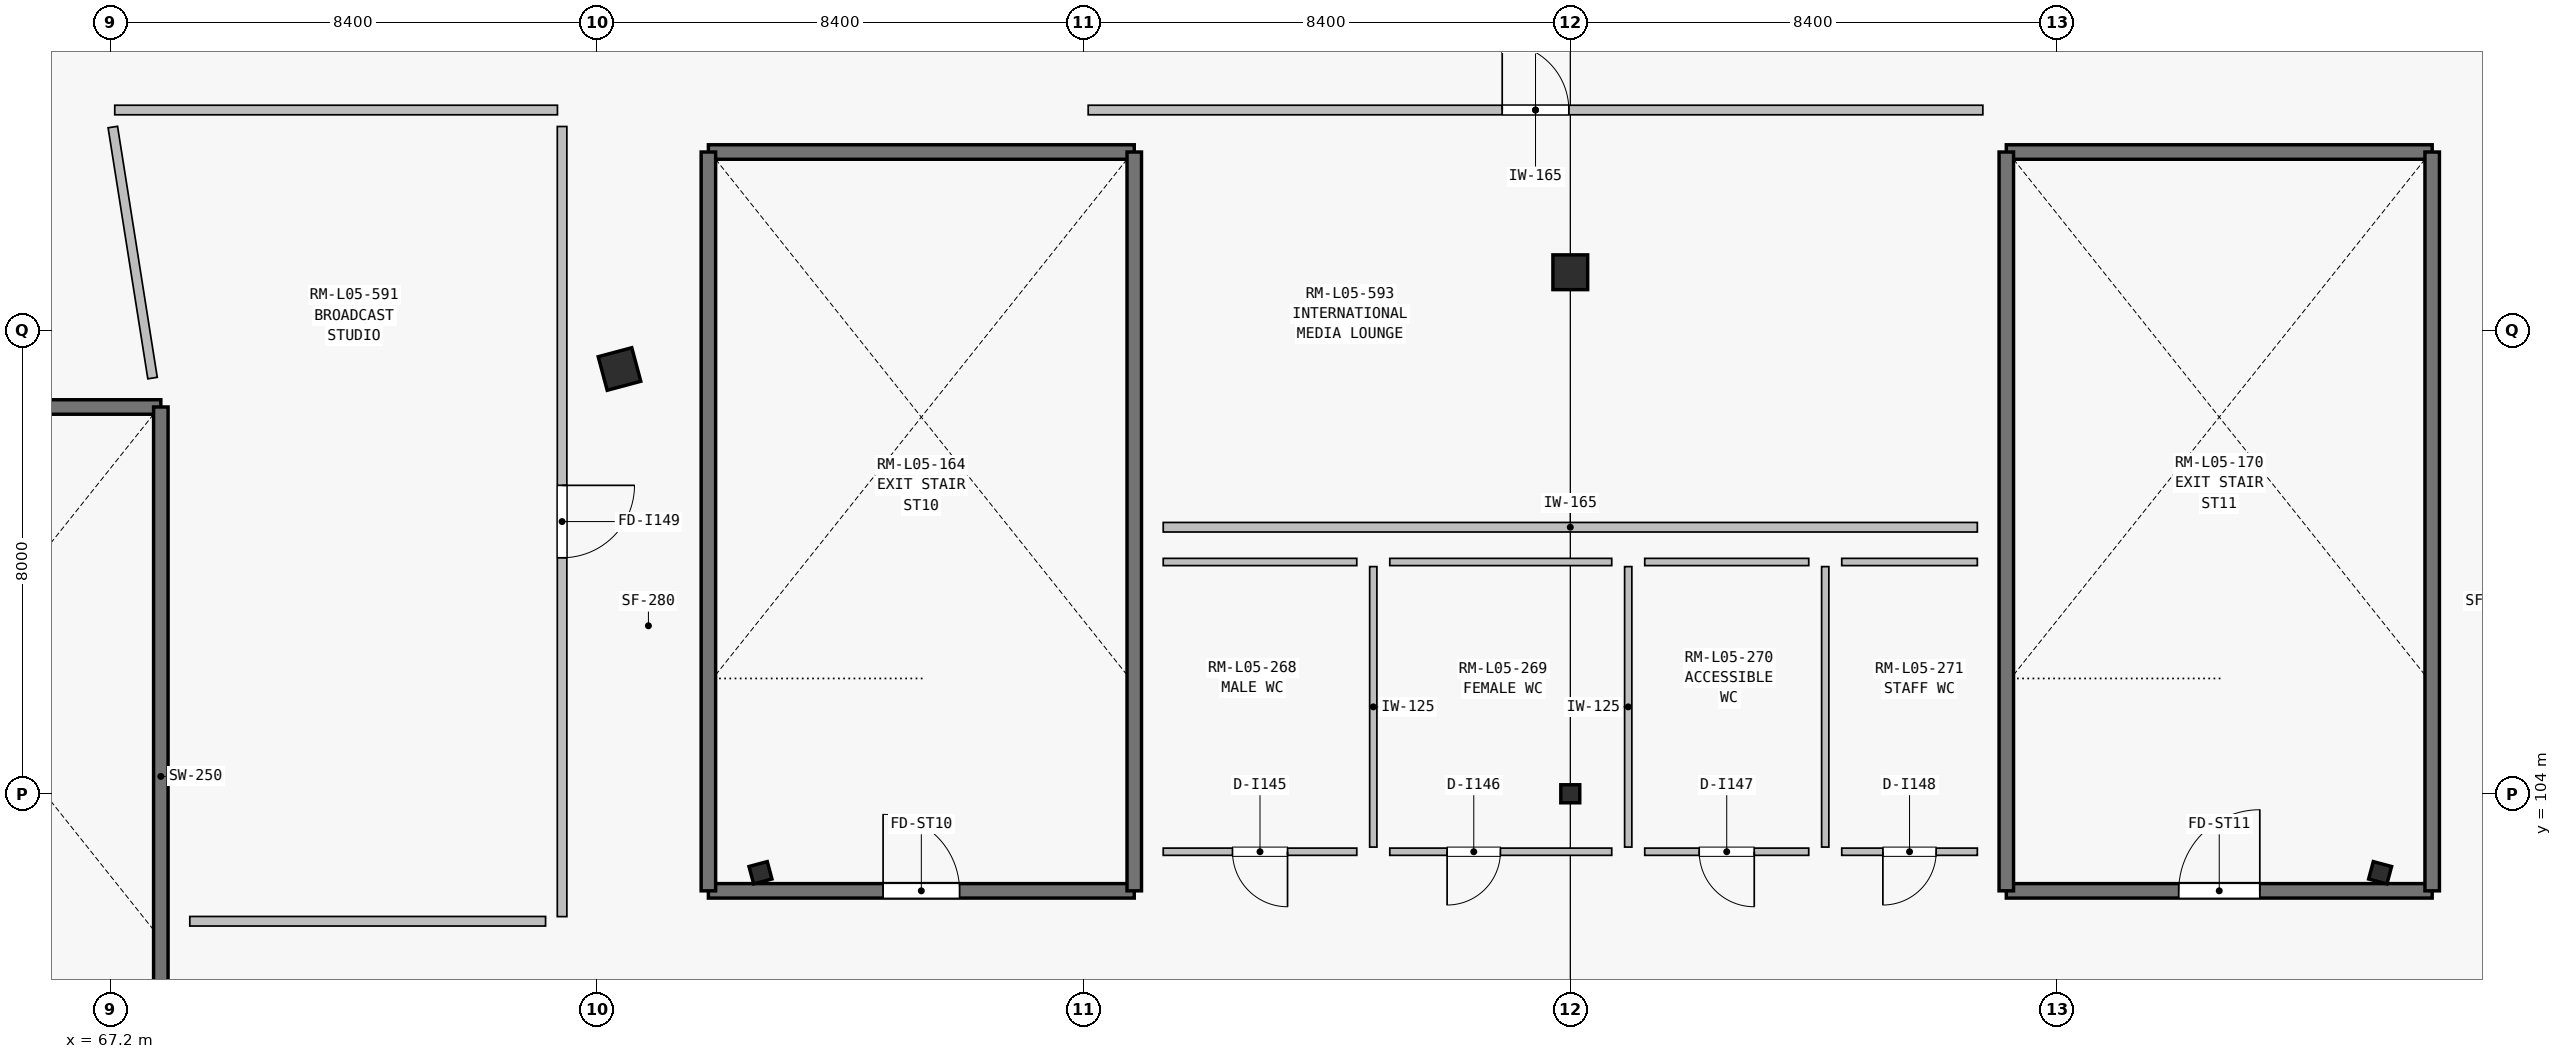
"""IFC4 building model, lengths in metres.
Left out: names, types, materials, properties, quantities, classifications, styles, units other than length and angle.
Written with IfcOpenShell. Run it as: python <this file> out.ifc"""

import sys

from ifc_helpers import new_model, si_unit, direction, frame, frame_2d, origin, origin_2d, place, context, subcontext, project, spatial, rectangle, i_section, extrude, element, fill, save


model = new_model("IFC4")
c1 = context("Model", 3, precision=1e-05, world=origin(), true_north=direction((0.0, 1.0)))
c2 = subcontext(c1, "Body", "Model", "MODEL_VIEW")
j1 = project(units=[si_unit("LENGTHUNIT", "METRE"), si_unit("PLANEANGLEUNIT", "RADIAN")], contexts=[c1])
p1 = place(None, origin())
s1 = spatial("IfcSite", under=j1, at=p1, CompositionType="ELEMENT")
p2 = place(p1, origin())
s2 = spatial("IfcBuilding", under=s1, at=p2, CompositionType="ELEMENT")
p3 = place(p2, frame((0.0, 0.0, 23.4)))
s3 = spatial("IfcBuildingStorey", under=s2, at=p3, CompositionType="ELEMENT", Elevation=23.4)
for number, where, z_axis, x_axis in (
    (1, (106.376, 102.637, 0.0), (0.0, 0.0, 1.0), (0.259, 0.966, 0.0)),
    (2, (92.4, 104.0, 0.0), (0.0, 0.0, 1.0), (0.0, 1.0, 0.0)),
    (3, (78.424, 102.637, 0.0), (0.0, 0.0, 1.0), (-0.259, 0.966, 0.0)),
):
    element("IfcColumn", number, at=place(p3, frame(where, z_axis=z_axis, x_axis=x_axis)), inside=s3, PredefinedType="COLUMN", context=c2, shape_type="SweptSolid", body=[
        extrude(i_section(OverallWidth=0.311, OverallDepth=0.327, WebThickness=0.016, FlangeThickness=0.025, at=origin_2d()), origin(), (0.0, 0.0, 1.0), 3.15),
    ])
for number, where, z_axis, x_axis in (
    (4, (92.4, 113.0, 0.0), (0.0, 0.0, 1.0), (0.0, 1.0, 0.0)),
    (5, (75.991, 111.33, 0.0), (0.0, 0.0, 1.0), (-0.259, 0.966, 0.0)),
):
    element("IfcColumn", number, at=place(p3, frame(where, z_axis=z_axis, x_axis=x_axis)), inside=s3, PredefinedType="COLUMN", context=c2, shape_type="SweptSolid", body=[
        extrude(rectangle(XDim=0.6, YDim=0.6, at=origin_2d()), origin(), (0.0, 0.0, 1.0), 3.15),
    ])
p4 = place(p3, frame((56.095, 113.709, 0.0), z_axis=(0.0, 0.0, 1.0), x_axis=(0.949760483421, 0.312977673536, 0.0)))
e6 = element("IfcWall", 6, at=p4, inside=s3, PredefinedType="SOLIDWALL", context=c2, shape_type="SweptSolid", body=[
    extrude(rectangle(XDim=18.693, YDim=0.265, at=frame_2d((9.346, 0.0))), origin(), (0.0, 0.0, 1.0), 3.18),
])
p5 = place(p4, frame((1.75, 0.0, 0.9)))
e7 = element("IfcOpeningElement", 7, at=p5, cuts=e6, PredefinedType="OPENING", context=c2, shape_type="SweptSolid", body=[
    extrude(rectangle(XDim=3.0, YDim=1.6, at=frame_2d((1.5, 0.8))), frame((0.0, 0.142, 0.0), z_axis=(0.0, -1.0, 0.0), x_axis=(1.0, 0.0, 0.0)), (0.0, 0.0, 1.0), 0.285),
])
p6 = place(p4, frame((6.5, 0.0, 0.9)))
e8 = element("IfcOpeningElement", 8, at=p6, cuts=e6, PredefinedType="OPENING", context=c2, shape_type="SweptSolid", body=[
    extrude(rectangle(XDim=2.7, YDim=1.55, at=frame_2d((1.35, 0.775))), frame((0.0, 0.142, 0.0), z_axis=(0.0, -1.0, 0.0), x_axis=(1.0, 0.0, 0.0)), (0.0, 0.0, 1.0), 0.285),
])
p7 = place(p4, frame((11.15, 0.0, 0.9)))
e9 = element("IfcOpeningElement", 9, at=p7, cuts=e6, PredefinedType="OPENING", context=c2, shape_type="SweptSolid", body=[
    extrude(rectangle(XDim=2.6, YDim=1.4, at=frame_2d((1.3, 0.7))), frame((0.0, 0.142, 0.0), z_axis=(0.0, -1.0, 0.0), x_axis=(1.0, 0.0, 0.0)), (0.0, 0.0, 1.0), 0.285),
])
p8 = place(p3, frame((60.725, 110.675, 0.0), z_axis=(0.0, 0.0, 1.0), x_axis=(1.0, 0.0, 0.0)))
e10 = element("IfcWall", 10, at=p8, inside=s3, PredefinedType="SHEAR", context=c2, shape_type="SweptSolid", body=[
    extrude(rectangle(XDim=7.35, YDim=0.25, at=frame_2d((3.675, 0.0))), origin(), (0.0, 0.0, 1.0), 3.08),
])
p9 = place(p3, frame((68.075, 97.925, 0.0), z_axis=(0.0, 0.0, 1.0), x_axis=(0.0, 1.0, 0.0)))
e11 = element("IfcWall", 11, at=p9, inside=s3, PredefinedType="SHEAR", context=c2, shape_type="SweptSolid", body=[
    extrude(rectangle(XDim=12.75, YDim=0.25, at=frame_2d((6.375, 0.0))), origin(), (0.0, 0.0, 1.0), 3.08),
])
p10 = place(p3, frame((77.525, 102.325, 0.0), z_axis=(0.0, 0.0, 1.0), x_axis=(1.0, 0.0, 0.0)))
e12 = element("IfcWall", 12, at=p10, inside=s3, PredefinedType="SHEAR", context=c2, shape_type="SweptSolid", body=[
    extrude(rectangle(XDim=7.35, YDim=0.25, at=frame_2d((3.675, 0.0))), origin(), (0.0, 0.0, 1.0), 3.08),
])
p11 = place(p10, frame((3.015, 0.0, 0.0)))
e13 = element("IfcOpeningElement", 13, at=p11, cuts=e12, PredefinedType="OPENING", context=c2, shape_type="SweptSolid", body=[
    extrude(rectangle(XDim=1.32, YDim=2.2, at=frame_2d((0.66, 1.1))), frame((0.0, 0.135, 0.0), z_axis=(0.0, -1.0, 0.0), x_axis=(1.0, 0.0, 0.0)), (0.0, 0.0, 1.0), 0.27),
])
p12 = place(p3, frame((77.525, 115.075, 0.0), z_axis=(0.0, 0.0, 1.0), x_axis=(1.0, 0.0, 0.0)))
e14 = element("IfcWall", 14, at=p12, inside=s3, PredefinedType="SHEAR", context=c2, shape_type="SweptSolid", body=[
    extrude(rectangle(XDim=7.35, YDim=0.25, at=frame_2d((3.675, 0.0))), origin(), (0.0, 0.0, 1.0), 3.08),
])
for number, where, z_axis, x_axis in (
    (15, (77.525, 102.325, 0.0), (0.0, 0.0, 1.0), (0.0, 1.0, 0.0)),
    (16, (84.875, 102.325, 0.0), (0.0, 0.0, 1.0), (0.0, 1.0, 0.0)),
):
    element("IfcWall", number, at=place(p3, frame(where, z_axis=z_axis, x_axis=x_axis)), inside=s3, PredefinedType="SHEAR", context=c2, shape_type="SweptSolid", body=[
        extrude(rectangle(XDim=12.75, YDim=0.25, at=frame_2d((6.375, 0.0))), origin(), (0.0, 0.0, 1.0), 3.08),
    ])
p13 = place(p3, frame((99.925, 102.325, 0.0), z_axis=(0.0, 0.0, 1.0), x_axis=(1.0, 0.0, 0.0)))
e17 = element("IfcWall", 17, at=p13, inside=s3, PredefinedType="SHEAR", context=c2, shape_type="SweptSolid", body=[
    extrude(rectangle(XDim=7.35, YDim=0.25, at=frame_2d((3.675, 0.0))), origin(), (0.0, 0.0, 1.0), 3.08),
])
p14 = place(p13, frame((2.975, 0.0, 0.0)))
e18 = element("IfcOpeningElement", 18, at=p14, cuts=e17, PredefinedType="OPENING", context=c2, shape_type="SweptSolid", body=[
    extrude(rectangle(XDim=1.4, YDim=2.2, at=frame_2d((0.7, 1.1))), frame((0.0, 0.135, 0.0), z_axis=(0.0, -1.0, 0.0), x_axis=(1.0, 0.0, 0.0)), (0.0, 0.0, 1.0), 0.27),
])
p15 = place(p3, frame((99.925, 115.075, 0.0), z_axis=(0.0, 0.0, 1.0), x_axis=(1.0, 0.0, 0.0)))
e19 = element("IfcWall", 19, at=p15, inside=s3, PredefinedType="SHEAR", context=c2, shape_type="SweptSolid", body=[
    extrude(rectangle(XDim=7.35, YDim=0.25, at=frame_2d((3.675, 0.0))), origin(), (0.0, 0.0, 1.0), 3.08),
])
for number, where, z_axis, x_axis in (
    (20, (99.925, 102.325, 0.0), (0.0, 0.0, 1.0), (0.0, 1.0, 0.0)),
    (21, (107.275, 102.325, 0.0), (0.0, 0.0, 1.0), (0.0, 1.0, 0.0)),
):
    element("IfcWall", number, at=place(p3, frame(where, z_axis=z_axis, x_axis=x_axis)), inside=s3, PredefinedType="SHEAR", context=c2, shape_type="SweptSolid", body=[
        extrude(rectangle(XDim=12.75, YDim=0.25, at=frame_2d((6.375, 0.0))), origin(), (0.0, 0.0, 1.0), 3.08),
    ])
p16 = place(p3, frame((89.0, 107.92, 0.0), z_axis=(0.0, 0.0, 1.0), x_axis=(0.0, -1.0, 0.0)))
e22 = element("IfcWall", 22, at=p16, inside=s3, PredefinedType="PARTITIONING", context=c2, shape_type="SweptSolid", body=[
    extrude(rectangle(XDim=4.84, YDim=0.125, at=frame_2d((2.42, 0.0))), origin(), (0.0, 0.0, 1.0), 2.445),
])
p17 = place(p3, frame((88.715, 103.0, 0.0), z_axis=(0.0, 0.0, 1.0), x_axis=(-1.0, 0.0, 0.0)))
e23 = element("IfcWall", 23, at=p17, inside=s3, PredefinedType="PARTITIONING", context=c2, shape_type="SweptSolid", body=[
    extrude(rectangle(XDim=3.34, YDim=0.125, at=frame_2d((1.67, 0.0))), origin(), (0.0, 0.0, 1.0), 2.445),
])
p18 = place(p17, frame((1.195, 0.0, 0.0)))
e24 = element("IfcOpeningElement", 24, at=p18, cuts=e23, PredefinedType="OPENING", context=c2, shape_type="SweptSolid", body=[
    extrude(rectangle(XDim=0.95, YDim=2.1, at=frame_2d((0.475, 1.05))), frame((0.0, 0.073, 0.0), z_axis=(0.0, -1.0, 0.0), x_axis=(1.0, 0.0, 0.0)), (0.0, 0.0, 1.0), 0.145),
])
p19 = place(p3, frame((85.375, 108.0, 0.0), z_axis=(0.0, 0.0, 1.0), x_axis=(1.0, 0.0, 0.0)))
e25 = element("IfcWall", 25, at=p19, inside=s3, PredefinedType="PARTITIONING", context=c2, shape_type="SweptSolid", body=[
    extrude(rectangle(XDim=3.34, YDim=0.125, at=frame_2d((1.67, 0.0))), origin(), (0.0, 0.0, 1.0), 3.18),
])
p20 = place(p3, frame((93.4, 107.92, 0.0), z_axis=(0.0, 0.0, 1.0), x_axis=(0.0, -1.0, 0.0)))
e26 = element("IfcWall", 26, at=p20, inside=s3, PredefinedType="PARTITIONING", context=c2, shape_type="SweptSolid", body=[
    extrude(rectangle(XDim=4.84, YDim=0.125, at=frame_2d((2.42, 0.0))), origin(), (0.0, 0.0, 1.0), 2.445),
])
p21 = place(p3, frame((93.115, 103.0, 0.0), z_axis=(0.0, 0.0, 1.0), x_axis=(-1.0, 0.0, 0.0)))
e27 = element("IfcWall", 27, at=p21, inside=s3, PredefinedType="PARTITIONING", context=c2, shape_type="SweptSolid", body=[
    extrude(rectangle(XDim=3.83, YDim=0.125, at=frame_2d((1.915, 0.0))), origin(), (0.0, 0.0, 1.0), 3.9),
])
p22 = place(p21, frame((1.921, 0.0, 0.0)))
e28 = element("IfcOpeningElement", 28, at=p22, cuts=e27, PredefinedType="OPENING", context=c2, shape_type="SweptSolid", body=[
    extrude(rectangle(XDim=0.92, YDim=2.1, at=frame_2d((0.46, 1.05))), frame((0.0, 0.073, 0.0), z_axis=(0.0, -1.0, 0.0), x_axis=(1.0, 0.0, 0.0)), (0.0, 0.0, 1.0), 0.145),
])
p23 = place(p3, frame((89.285, 108.0, 0.0), z_axis=(0.0, 0.0, 1.0), x_axis=(1.0, 0.0, 0.0)))
e29 = element("IfcWall", 29, at=p23, inside=s3, PredefinedType="PARTITIONING", context=c2, shape_type="SweptSolid", body=[
    extrude(rectangle(XDim=3.83, YDim=0.125, at=frame_2d((1.915, 0.0))), origin(), (0.0, 0.0, 1.0), 3.18),
])
p24 = place(p3, frame((96.8, 107.92, 0.0), z_axis=(0.0, 0.0, 1.0), x_axis=(0.0, -1.0, 0.0)))
e30 = element("IfcWall", 30, at=p24, inside=s3, PredefinedType="PARTITIONING", context=c2, shape_type="SweptSolid", body=[
    extrude(rectangle(XDim=4.84, YDim=0.125, at=frame_2d((2.42, 0.0))), origin(), (0.0, 0.0, 1.0), 2.445),
])
p25 = place(p3, frame((96.515, 103.0, 0.0), z_axis=(0.0, 0.0, 1.0), x_axis=(-1.0, 0.0, 0.0)))
e31 = element("IfcWall", 31, at=p25, inside=s3, PredefinedType="PARTITIONING", context=c2, shape_type="SweptSolid", body=[
    extrude(rectangle(XDim=2.83, YDim=0.125, at=frame_2d((1.415, 0.0))), origin(), (0.0, 0.0, 1.0), 3.9),
])
p26 = place(p25, frame((0.94, 0.0, 0.0)))
e32 = element("IfcOpeningElement", 32, at=p26, cuts=e31, PredefinedType="OPENING", context=c2, shape_type="SweptSolid", body=[
    extrude(rectangle(XDim=0.95, YDim=2.1, at=frame_2d((0.475, 1.05))), frame((0.0, 0.073, 0.0), z_axis=(0.0, -1.0, 0.0), x_axis=(1.0, 0.0, 0.0)), (0.0, 0.0, 1.0), 0.145),
])
p27 = place(p3, frame((93.685, 108.0, 0.0), z_axis=(0.0, 0.0, 1.0), x_axis=(1.0, 0.0, 0.0)))
e33 = element("IfcWall", 33, at=p27, inside=s3, PredefinedType="PARTITIONING", context=c2, shape_type="SweptSolid", body=[
    extrude(rectangle(XDim=2.83, YDim=0.125, at=frame_2d((1.415, 0.0))), origin(), (0.0, 0.0, 1.0), 3.18),
])
p28 = place(p3, frame((99.425, 103.0, 0.0), z_axis=(0.0, 0.0, 1.0), x_axis=(-1.0, 0.0, 0.0)))
e34 = element("IfcWall", 34, at=p28, inside=s3, PredefinedType="PARTITIONING", context=c2, shape_type="SweptSolid", body=[
    extrude(rectangle(XDim=2.34, YDim=0.125, at=frame_2d((1.17, 0.0))), origin(), (0.0, 0.0, 1.0), 2.445),
])
p29 = place(p28, frame((0.71, 0.0, 0.0)))
e35 = element("IfcOpeningElement", 35, at=p29, cuts=e34, PredefinedType="OPENING", context=c2, shape_type="SweptSolid", body=[
    extrude(rectangle(XDim=0.92, YDim=2.1, at=frame_2d((0.46, 1.05))), frame((0.0, 0.073, 0.0), z_axis=(0.0, -1.0, 0.0), x_axis=(1.0, 0.0, 0.0)), (0.0, 0.0, 1.0), 0.145),
])
p30 = place(p3, frame((97.085, 108.0, 0.0), z_axis=(0.0, 0.0, 1.0), x_axis=(1.0, 0.0, 0.0)))
e36 = element("IfcWall", 36, at=p30, inside=s3, PredefinedType="PARTITIONING", context=c2, shape_type="SweptSolid", body=[
    extrude(rectangle(XDim=2.34, YDim=0.125, at=frame_2d((1.17, 0.0))), origin(), (0.0, 0.0, 1.0), 3.18),
])
p31 = place(p3, frame((67.28, 115.8, 0.0), z_axis=(0.0, 0.0, 1.0), x_axis=(1.0, 0.0, 0.0)))
e37 = element("IfcWall", 37, at=p31, inside=s3, PredefinedType="PARTITIONING", context=c2, shape_type="SweptSolid", body=[
    extrude(rectangle(XDim=7.64, YDim=0.165, at=frame_2d((3.82, 0.0))), origin(), (0.0, 0.0, 1.0), 3.18),
])
p32 = place(p3, frame((75.0, 115.515, 0.0), z_axis=(0.0, 0.0, 1.0), x_axis=(0.0, -1.0, 0.0)))
e38 = element("IfcWall", 38, at=p32, inside=s3, PredefinedType="PARTITIONING", context=c2, shape_type="SweptSolid", body=[
    extrude(rectangle(XDim=13.635, YDim=0.165, at=frame_2d((6.818, 0.0))), origin(), (0.0, 0.0, 1.0), 2.445),
])
p33 = place(p32, frame((6.193, 0.0, 0.0)))
e39 = element("IfcOpeningElement", 39, at=p33, cuts=e38, PredefinedType="OPENING", context=c2, shape_type="SweptSolid", body=[
    extrude(rectangle(XDim=1.25, YDim=2.25, at=frame_2d((0.625, 1.125))), frame((0.0, 0.093, 0.0), z_axis=(0.0, -1.0, 0.0), x_axis=(1.0, 0.0, 0.0)), (0.0, 0.0, 1.0), 0.185),
])
p34 = place(p3, frame((74.715, 101.8, 0.0), z_axis=(0.0, 0.0, 1.0), x_axis=(-1.0, 0.0, 0.0)))
e40 = element("IfcWall", 40, at=p34, inside=s3, PredefinedType="PARTITIONING", context=c2, shape_type="SweptSolid", body=[
    extrude(rectangle(XDim=6.14, YDim=0.165, at=frame_2d((3.07, 0.0))), origin(), (0.0, 0.0, 1.0), 2.445),
])
p35 = place(p3, frame((67.932, 111.174, 0.0), z_axis=(0.0, 0.0, 1.0), x_axis=(-0.156305577001, 0.987708745835, 0.0)))
e41 = element("IfcWall", 41, at=p35, inside=s3, PredefinedType="PARTITIONING", context=c2, shape_type="SweptSolid", body=[
    extrude(rectangle(XDim=4.386, YDim=0.165, at=frame_2d((2.193, 0.0))), origin(), (0.0, 0.0, 1.0), 3.18),
])
p36 = place(p3, frame((84.08, 115.8, 0.0), z_axis=(0.0, 0.0, 1.0), x_axis=(1.0, 0.0, 0.0)))
e42 = element("IfcWall", 42, at=p36, inside=s3, PredefinedType="PARTITIONING", context=c2, shape_type="SweptSolid", body=[
    extrude(rectangle(XDim=15.44, YDim=0.165, at=frame_2d((7.72, 0.0))), origin(), (0.0, 0.0, 1.0), 3.18),
])
p37 = place(p36, frame((7.145, 0.0, 0.0)))
e43 = element("IfcOpeningElement", 43, at=p37, cuts=e42, PredefinedType="OPENING", context=c2, shape_type="SweptSolid", body=[
    extrude(rectangle(XDim=1.15, YDim=2.2, at=frame_2d((0.575, 1.1))), frame((0.0, 0.093, 0.0), z_axis=(0.0, -1.0, 0.0), x_axis=(1.0, 0.0, 0.0)), (0.0, 0.0, 1.0), 0.185),
])
p38 = place(p3, frame((99.425, 108.6, 0.0), z_axis=(0.0, 0.0, 1.0), x_axis=(-1.0, 0.0, 0.0)))
e44 = element("IfcWall", 44, at=p38, inside=s3, PredefinedType="PARTITIONING", context=c2, shape_type="SweptSolid", body=[
    extrude(rectangle(XDim=14.05, YDim=0.165, at=frame_2d((7.025, 0.0))), origin(), (0.0, 0.0, 1.0), 3.18),
])
p39 = place(p11, origin())
e45 = element("IfcDoor", 45, at=p39, inside=s3, OperationType="SINGLE_SWING_LEFT", PredefinedType="DOOR", context=c2, shape_type="SweptSolid", body=[
    extrude(rectangle(XDim=1.32, YDim=2.2, at=frame_2d((0.66, 1.1))), frame((0.0, 0.025, 0.0), z_axis=(0.0, -1.0, 0.0), x_axis=(1.0, 0.0, 0.0)), (0.0, 0.0, 1.0), 0.05),
])
fill(e13, e45)
p40 = place(p14, origin())
e46 = element("IfcDoor", 46, at=p40, inside=s3, OperationType="SINGLE_SWING_RIGHT", PredefinedType="DOOR", context=c2, shape_type="SweptSolid", body=[
    extrude(rectangle(XDim=1.4, YDim=2.2, at=frame_2d((0.7, 1.1))), frame((0.0, 0.025, 0.0), z_axis=(0.0, -1.0, 0.0), x_axis=(1.0, 0.0, 0.0)), (0.0, 0.0, 1.0), 0.05),
])
fill(e18, e46)
p41 = place(p18, origin())
e47 = element("IfcDoor", 47, at=p41, inside=s3, OperationType="SINGLE_SWING_LEFT", PredefinedType="DOOR", context=c2, shape_type="SweptSolid", body=[
    extrude(rectangle(XDim=0.95, YDim=2.1, at=frame_2d((0.475, 1.05))), frame((0.0, 0.025, 0.0), z_axis=(0.0, -1.0, 0.0), x_axis=(1.0, 0.0, 0.0)), (0.0, 0.0, 1.0), 0.05),
])
fill(e24, e47)
p42 = place(p22, origin())
e48 = element("IfcDoor", 48, at=p42, inside=s3, OperationType="SINGLE_SWING_RIGHT", PredefinedType="DOOR", context=c2, shape_type="SweptSolid", body=[
    extrude(rectangle(XDim=0.92, YDim=2.1, at=frame_2d((0.46, 1.05))), frame((0.0, 0.025, 0.0), z_axis=(0.0, -1.0, 0.0), x_axis=(1.0, 0.0, 0.0)), (0.0, 0.0, 1.0), 0.05),
])
fill(e28, e48)
p43 = place(p26, origin())
e49 = element("IfcDoor", 49, at=p43, inside=s3, OperationType="SINGLE_SWING_LEFT", PredefinedType="DOOR", context=c2, shape_type="SweptSolid", body=[
    extrude(rectangle(XDim=0.95, YDim=2.1, at=frame_2d((0.475, 1.05))), frame((0.0, 0.025, 0.0), z_axis=(0.0, -1.0, 0.0), x_axis=(1.0, 0.0, 0.0)), (0.0, 0.0, 1.0), 0.05),
])
fill(e32, e49)
p44 = place(p29, origin())
e50 = element("IfcDoor", 50, at=p44, inside=s3, OperationType="SINGLE_SWING_RIGHT", PredefinedType="DOOR", context=c2, shape_type="SweptSolid", body=[
    extrude(rectangle(XDim=0.92, YDim=2.1, at=frame_2d((0.46, 1.05))), frame((0.0, 0.025, 0.0), z_axis=(0.0, -1.0, 0.0), x_axis=(1.0, 0.0, 0.0)), (0.0, 0.0, 1.0), 0.05),
])
fill(e35, e50)
p45 = place(p33, origin())
e51 = element("IfcDoor", 51, at=p45, inside=s3, OperationType="SINGLE_SWING_LEFT", PredefinedType="DOOR", context=c2, shape_type="SweptSolid", body=[
    extrude(rectangle(XDim=1.25, YDim=2.25, at=frame_2d((0.625, 1.125))), frame((0.0, 0.025, 0.0), z_axis=(0.0, -1.0, 0.0), x_axis=(1.0, 0.0, 0.0)), (0.0, 0.0, 1.0), 0.05),
])
fill(e39, e51)
p46 = place(p37, origin())
e52 = element("IfcDoor", 52, at=p46, inside=s3, OperationType="SINGLE_SWING_LEFT", PredefinedType="DOOR", context=c2, shape_type="SweptSolid", body=[
    extrude(rectangle(XDim=1.15, YDim=2.2, at=frame_2d((0.575, 1.1))), frame((0.0, 0.025, 0.0), z_axis=(0.0, -1.0, 0.0), x_axis=(1.0, 0.0, 0.0)), (0.0, 0.0, 1.0), 0.05),
])
fill(e43, e52)
save(model, sys.argv[1])
